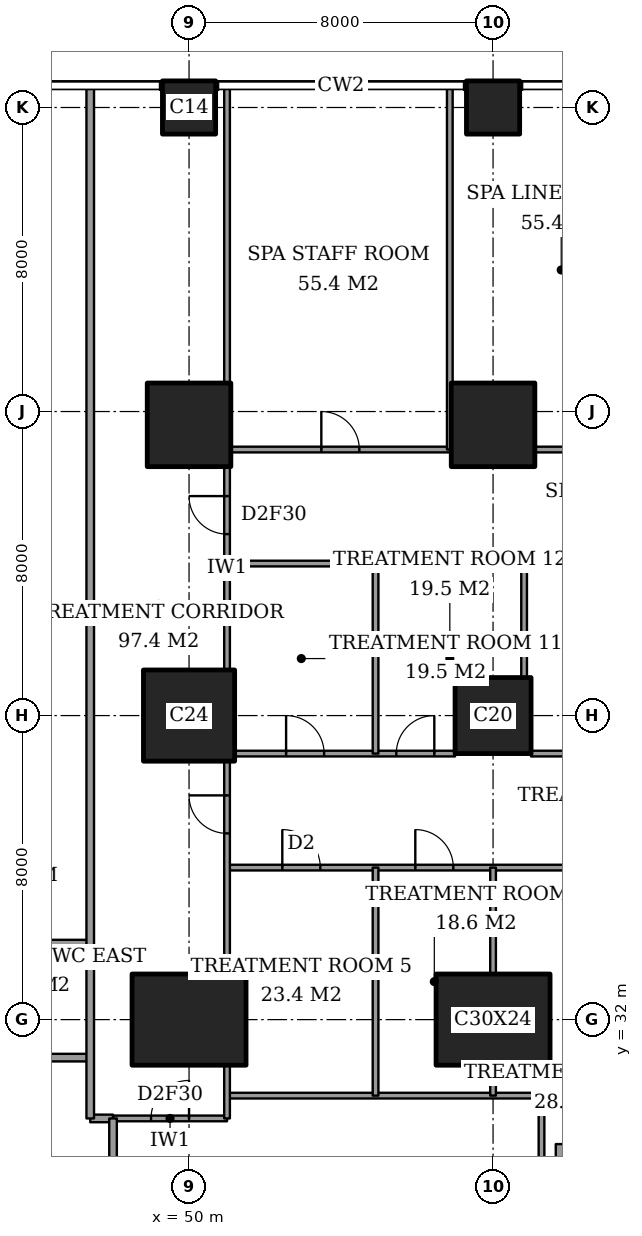
"""IFC4 building model, lengths in metres.
Left out: names, types, materials, properties, quantities, classifications, styles, units other than length and angle.
Written with IfcOpenShell. Run it as: python <this file> out.ifc"""

import sys

from ifc_helpers import new_model, si_unit, direction, frame, frame_2d, origin, origin_2d, place, context, subcontext, project, spatial, rectangle, extrude, element, fill, save


model = new_model("IFC4")
c1 = context("Model", 3, precision=1e-05, world=origin(), true_north=direction((0.0, 1.0)))
c2 = subcontext(c1, "Body", "Model", "MODEL_VIEW")
j1 = project(units=[si_unit("LENGTHUNIT", "METRE"), si_unit("PLANEANGLEUNIT", "RADIAN")], contexts=[c1])
p1 = place(None, origin())
s1 = spatial("IfcSite", under=j1, at=p1, CompositionType="ELEMENT")
p2 = place(p1, origin())
s2 = spatial("IfcBuilding", under=s1, at=p2, CompositionType="ELEMENT")
p3 = place(p2, frame((0.0, 0.0, 11.0)))
s3 = spatial("IfcBuildingStorey", under=s2, at=p3, CompositionType="ELEMENT", Elevation=11.0)
p4 = place(p3, frame((50.0, 32.0, 0.0), z_axis=(0.0, 0.0, 1.0), x_axis=(1.0, 0.0, 0.0)))
e1 = element("IfcColumn", 1, at=p4, inside=s3, PredefinedType="COLUMN", context=c2, shape_type="SweptSolid", body=[
    extrude(rectangle(XDim=3.0, YDim=2.4, at=origin_2d()), origin(), (0.0, 0.0, 1.0), 5.0),
])
p5 = place(p3, frame((50.0, 40.0, 0.0), z_axis=(0.0, 0.0, 1.0), x_axis=(1.0, 0.0, 0.0)))
e2 = element("IfcColumn", 2, at=p5, inside=s3, PredefinedType="COLUMN", context=c2, shape_type="SweptSolid", body=[
    extrude(rectangle(XDim=2.4, YDim=2.4, at=origin_2d()), origin(), (0.0, 0.0, 1.0), 5.0),
])
p6 = place(p3, frame((50.0, 47.65, 0.0), z_axis=(0.0, 0.0, 1.0), x_axis=(1.0, 0.0, 0.0)))
e3 = element("IfcColumn", 3, at=p6, inside=s3, PredefinedType="COLUMN", context=c2, shape_type="SweptSolid", body=[
    extrude(rectangle(XDim=2.2, YDim=2.2, at=origin_2d()), origin(), (0.0, 0.0, 1.0), 5.0),
])
p7 = place(p3, frame((50.0, 56.0, 0.0), z_axis=(0.0, 0.0, 1.0), x_axis=(1.0, 0.0, 0.0)))
e4 = element("IfcColumn", 4, at=p7, inside=s3, PredefinedType="COLUMN", context=c2, shape_type="SweptSolid", body=[
    extrude(rectangle(XDim=1.4, YDim=1.4, at=origin_2d()), origin(), (0.0, 0.0, 1.0), 5.0),
])
p8 = place(p3, frame((58.0, 32.0, 0.0), z_axis=(0.0, 0.0, 1.0), x_axis=(1.0, 0.0, 0.0)))
e5 = element("IfcColumn", 5, at=p8, inside=s3, PredefinedType="COLUMN", context=c2, shape_type="SweptSolid", body=[
    extrude(rectangle(XDim=3.0, YDim=2.4, at=origin_2d()), origin(), (0.0, 0.0, 1.0), 5.0),
])
p9 = place(p3, frame((58.0, 40.0, 0.0), z_axis=(0.0, 0.0, 1.0), x_axis=(1.0, 0.0, 0.0)))
e6 = element("IfcColumn", 6, at=p9, inside=s3, PredefinedType="COLUMN", context=c2, shape_type="SweptSolid", body=[
    extrude(rectangle(XDim=2.0, YDim=2.0, at=origin_2d()), origin(), (0.0, 0.0, 1.0), 5.0),
])
p10 = place(p3, frame((58.0, 47.65, 0.0), z_axis=(0.0, 0.0, 1.0), x_axis=(1.0, 0.0, 0.0)))
e7 = element("IfcColumn", 7, at=p10, inside=s3, PredefinedType="COLUMN", context=c2, shape_type="SweptSolid", body=[
    extrude(rectangle(XDim=2.2, YDim=2.2, at=origin_2d()), origin(), (0.0, 0.0, 1.0), 5.0),
])
p11 = place(p3, frame((58.0, 56.0, 0.0), z_axis=(0.0, 0.0, 1.0), x_axis=(1.0, 0.0, 0.0)))
e8 = element("IfcColumn", 8, at=p11, inside=s3, PredefinedType="COLUMN", context=c2, shape_type="SweptSolid", body=[
    extrude(rectangle(XDim=1.4, YDim=1.4, at=origin_2d()), origin(), (0.0, 0.0, 1.0), 5.0),
])
p12 = place(p3, frame((64.1, 28.35, 0.0), z_axis=(0.0, 0.0, 1.0), x_axis=(-1.0, 0.0, 0.0)))
e9 = element("IfcWall", 9, at=p12, inside=s3, PredefinedType="SHEAR", context=c2, shape_type="SweptSolid", body=[
    extrude(rectangle(XDim=4.45, YDim=0.75, at=frame_2d((2.225, 0.0))), origin(), (0.0, 0.0, 1.0), 5.0),
])
p13 = place(p3, frame((47.4, 29.4, 0.0), z_axis=(0.0, 0.0, 1.0), x_axis=(1.0, 0.0, 0.0)))
e10 = element("IfcWall", 10, at=p13, inside=s3, PredefinedType="PARTITIONING", context=c2, shape_type="SweptSolid", body=[
    extrude(rectangle(XDim=0.6, YDim=0.2, at=frame_2d((0.3, 0.0))), origin(), (0.0, 0.0, 1.0), 4.7),
])
p14 = place(p3, frame((48.0, 29.4, 0.0), z_axis=(0.0, 0.0, 1.0), x_axis=(1.0, 0.0, 0.0)))
e11 = element("IfcWall", 11, at=p14, inside=s3, PredefinedType="PARTITIONING", context=c2, shape_type="SweptSolid", body=[
    extrude(rectangle(XDim=3.0, YDim=0.15, at=frame_2d((1.5, 0.0))), origin(), (0.0, 0.0, 1.0), 4.7),
])
p15 = place(p14, frame((1.0, 0.0, 0.0)))
e12 = element("IfcOpeningElement", 12, at=p15, cuts=e11, PredefinedType="OPENING", context=c2, shape_type="SweptSolid", body=[
    extrude(rectangle(XDim=1.0, YDim=2.1, at=frame_2d((0.5, 1.05))), frame((0.0, 0.085, 0.0), z_axis=(0.0, -1.0, 0.0), x_axis=(1.0, 0.0, 0.0)), (0.0, 0.0, 1.0), 0.17),
])
p16 = place(p3, frame((51.0, 30.0, 0.0), z_axis=(0.0, 0.0, 1.0), x_axis=(1.0, 0.0, 0.0)))
e13 = element("IfcWall", 13, at=p16, inside=s3, PredefinedType="PARTITIONING", context=c2, shape_type="SweptSolid", body=[
    extrude(rectangle(XDim=23.45, YDim=0.15, at=frame_2d((11.725, 0.0))), origin(), (0.0, 0.0, 1.0), 4.7),
])
p17 = place(p3, frame((42.0, 31.0, 0.0), z_axis=(0.0, 0.0, 1.0), x_axis=(1.0, 0.0, 0.0)))
e14 = element("IfcWall", 14, at=p17, inside=s3, PredefinedType="PARTITIONING", context=c2, shape_type="SweptSolid", body=[
    extrude(rectangle(XDim=5.4, YDim=0.2, at=frame_2d((2.7, 0.0))), origin(), (0.0, 0.0, 1.0), 4.7),
])
p18 = place(p17, frame((2.2, 0.0, 0.0)))
e15 = element("IfcOpeningElement", 15, at=p18, cuts=e14, PredefinedType="OPENING", context=c2, shape_type="SweptSolid", body=[
    extrude(rectangle(XDim=1.0, YDim=2.1, at=frame_2d((0.5, 1.05))), frame((0.0, 0.11, 0.0), z_axis=(0.0, -1.0, 0.0), x_axis=(1.0, 0.0, 0.0)), (0.0, 0.0, 1.0), 0.22),
])
p19 = place(p3, frame((42.0, 34.0, 0.0), z_axis=(0.0, 0.0, 1.0), x_axis=(1.0, 0.0, 0.0)))
e16 = element("IfcWall", 16, at=p19, inside=s3, PredefinedType="PARTITIONING", context=c2, shape_type="SweptSolid", body=[
    extrude(rectangle(XDim=5.4, YDim=0.2, at=frame_2d((2.7, 0.0))), origin(), (0.0, 0.0, 1.0), 4.7),
])
p20 = place(p3, frame((51.0, 36.0, 0.0), z_axis=(0.0, 0.0, 1.0), x_axis=(1.0, 0.0, 0.0)))
e17 = element("IfcWall", 17, at=p20, inside=s3, PredefinedType="PARTITIONING", context=c2, shape_type="SweptSolid", body=[
    extrude(rectangle(XDim=23.45, YDim=0.15, at=frame_2d((11.725, 0.0))), origin(), (0.0, 0.0, 1.0), 4.7),
])
p21 = place(p20, frame((1.454, 0.0, 0.0)))
e18 = element("IfcOpeningElement", 18, at=p21, cuts=e17, PredefinedType="OPENING", context=c2, shape_type="SweptSolid", body=[
    extrude(rectangle(XDim=1.0, YDim=2.1, at=frame_2d((0.5, 1.05))), frame((0.0, 0.085, 0.0), z_axis=(0.0, -1.0, 0.0), x_axis=(1.0, 0.0, 0.0)), (0.0, 0.0, 1.0), 0.17),
])
p22 = place(p20, frame((4.954, 0.0, 0.0)))
e19 = element("IfcOpeningElement", 19, at=p22, cuts=e17, PredefinedType="OPENING", context=c2, shape_type="SweptSolid", body=[
    extrude(rectangle(XDim=1.0, YDim=2.1, at=frame_2d((0.5, 1.05))), frame((0.0, 0.085, 0.0), z_axis=(0.0, -1.0, 0.0), x_axis=(1.0, 0.0, 0.0)), (0.0, 0.0, 1.0), 0.17),
])
p23 = place(p20, frame((8.863, 0.0, 0.0)))
e20 = element("IfcOpeningElement", 20, at=p23, cuts=e17, PredefinedType="OPENING", context=c2, shape_type="SweptSolid", body=[
    extrude(rectangle(XDim=1.0, YDim=2.1, at=frame_2d((0.5, 1.05))), frame((0.0, 0.085, 0.0), z_axis=(0.0, -1.0, 0.0), x_axis=(1.0, 0.0, 0.0)), (0.0, 0.0, 1.0), 0.17),
])
p24 = place(p20, frame((12.688, 0.0, 0.0)))
e21 = element("IfcOpeningElement", 21, at=p24, cuts=e17, PredefinedType="OPENING", context=c2, shape_type="SweptSolid", body=[
    extrude(rectangle(XDim=1.0, YDim=2.1, at=frame_2d((0.5, 1.05))), frame((0.0, 0.085, 0.0), z_axis=(0.0, -1.0, 0.0), x_axis=(1.0, 0.0, 0.0)), (0.0, 0.0, 1.0), 0.17),
])
p25 = place(p20, frame((16.596, 0.0, 0.0)))
e22 = element("IfcOpeningElement", 22, at=p25, cuts=e17, PredefinedType="OPENING", context=c2, shape_type="SweptSolid", body=[
    extrude(rectangle(XDim=1.0, YDim=2.1, at=frame_2d((0.5, 1.05))), frame((0.0, 0.085, 0.0), z_axis=(0.0, -1.0, 0.0), x_axis=(1.0, 0.0, 0.0)), (0.0, 0.0, 1.0), 0.17),
])
p26 = place(p20, frame((20.996, 0.0, 0.0)))
e23 = element("IfcOpeningElement", 23, at=p26, cuts=e17, PredefinedType="OPENING", context=c2, shape_type="SweptSolid", body=[
    extrude(rectangle(XDim=1.0, YDim=2.1, at=frame_2d((0.5, 1.05))), frame((0.0, 0.085, 0.0), z_axis=(0.0, -1.0, 0.0), x_axis=(1.0, 0.0, 0.0)), (0.0, 0.0, 1.0), 0.17),
])
p27 = place(p3, frame((51.2, 39.0, 0.0), z_axis=(0.0, 0.0, 1.0), x_axis=(1.0, 0.0, 0.0)))
e24 = element("IfcWall", 24, at=p27, inside=s3, PredefinedType="PARTITIONING", context=c2, shape_type="SweptSolid", body=[
    extrude(rectangle(XDim=5.8, YDim=0.15, at=frame_2d((2.9, 0.0))), origin(), (0.0, 0.0, 1.0), 4.7),
])
p28 = place(p27, frame((1.354, 0.0, 0.0)))
e25 = element("IfcOpeningElement", 25, at=p28, cuts=e24, PredefinedType="OPENING", context=c2, shape_type="SweptSolid", body=[
    extrude(rectangle(XDim=1.0, YDim=2.1, at=frame_2d((0.5, 1.05))), frame((0.0, 0.085, 0.0), z_axis=(0.0, -1.0, 0.0), x_axis=(1.0, 0.0, 0.0)), (0.0, 0.0, 1.0), 0.17),
])
p29 = place(p27, frame((4.254, 0.0, 0.0)))
e26 = element("IfcOpeningElement", 26, at=p29, cuts=e24, PredefinedType="OPENING", context=c2, shape_type="SweptSolid", body=[
    extrude(rectangle(XDim=1.0, YDim=2.1, at=frame_2d((0.5, 1.05))), frame((0.0, 0.085, 0.0), z_axis=(0.0, -1.0, 0.0), x_axis=(1.0, 0.0, 0.0)), (0.0, 0.0, 1.0), 0.17),
])
p30 = place(p3, frame((59.0, 39.0, 0.0), z_axis=(0.0, 0.0, 1.0), x_axis=(1.0, 0.0, 0.0)))
e27 = element("IfcWall", 27, at=p30, inside=s3, PredefinedType="PARTITIONING", context=c2, shape_type="SweptSolid", body=[
    extrude(rectangle(XDim=5.55, YDim=0.15, at=frame_2d((2.775, 0.0))), origin(), (0.0, 0.0, 1.0), 4.7),
])
p31 = place(p30, frame((1.363, 0.0, 0.0)))
e28 = element("IfcOpeningElement", 28, at=p31, cuts=e27, PredefinedType="OPENING", context=c2, shape_type="SweptSolid", body=[
    extrude(rectangle(XDim=1.0, YDim=2.1, at=frame_2d((0.5, 1.05))), frame((0.0, 0.085, 0.0), z_axis=(0.0, -1.0, 0.0), x_axis=(1.0, 0.0, 0.0)), (0.0, 0.0, 1.0), 0.17),
])
p32 = place(p30, frame((4.137, 0.0, 0.0)))
e29 = element("IfcOpeningElement", 29, at=p32, cuts=e27, PredefinedType="OPENING", context=c2, shape_type="SweptSolid", body=[
    extrude(rectangle(XDim=1.0, YDim=2.1, at=frame_2d((0.5, 1.05))), frame((0.0, 0.085, 0.0), z_axis=(0.0, -1.0, 0.0), x_axis=(1.0, 0.0, 0.0)), (0.0, 0.0, 1.0), 0.17),
])
p33 = place(p3, frame((51.0, 44.0, 0.0), z_axis=(0.0, 0.0, 1.0), x_axis=(1.0, 0.0, 0.0)))
e30 = element("IfcWall", 30, at=p33, inside=s3, PredefinedType="PARTITIONING", context=c2, shape_type="SweptSolid", body=[
    extrude(rectangle(XDim=23.45, YDim=0.15, at=frame_2d((11.725, 0.0))), origin(), (0.0, 0.0, 1.0), 4.7),
])
p34 = place(p3, frame((51.1, 47.0, 0.0), z_axis=(0.0, 0.0, 1.0), x_axis=(1.0, 0.0, 0.0)))
e31 = element("IfcWall", 31, at=p34, inside=s3, PredefinedType="PARTITIONING", context=c2, shape_type="SweptSolid", body=[
    extrude(rectangle(XDim=5.8, YDim=0.15, at=frame_2d((2.9, 0.0))), origin(), (0.0, 0.0, 1.0), 4.7),
])
p35 = place(p34, frame((2.381, 0.0, 0.0)))
e32 = element("IfcOpeningElement", 32, at=p35, cuts=e31, PredefinedType="OPENING", context=c2, shape_type="SweptSolid", body=[
    extrude(rectangle(XDim=1.0, YDim=2.1, at=frame_2d((0.5, 1.05))), frame((0.0, 0.085, 0.0), z_axis=(0.0, -1.0, 0.0), x_axis=(1.0, 0.0, 0.0)), (0.0, 0.0, 1.0), 0.17),
])
p36 = place(p3, frame((59.1, 47.0, 0.0), z_axis=(0.0, 0.0, 1.0), x_axis=(1.0, 0.0, 0.0)))
e33 = element("IfcWall", 33, at=p36, inside=s3, PredefinedType="PARTITIONING", context=c2, shape_type="SweptSolid", body=[
    extrude(rectangle(XDim=6.9, YDim=0.15, at=frame_2d((3.45, 0.0))), origin(), (0.0, 0.0, 1.0), 4.7),
])
p37 = place(p36, frame((1.363, 0.0, 0.0)))
e34 = element("IfcOpeningElement", 34, at=p37, cuts=e33, PredefinedType="OPENING", context=c2, shape_type="SweptSolid", body=[
    extrude(rectangle(XDim=0.9, YDim=2.1, at=frame_2d((0.45, 1.05))), frame((0.0, 0.085, 0.0), z_axis=(0.0, -1.0, 0.0), x_axis=(1.0, 0.0, 0.0)), (0.0, 0.0, 1.0), 0.17),
])
p38 = place(p36, frame((4.812, 0.0, 0.0)))
e35 = element("IfcOpeningElement", 35, at=p38, cuts=e33, PredefinedType="OPENING", context=c2, shape_type="SweptSolid", body=[
    extrude(rectangle(XDim=0.9, YDim=2.1, at=frame_2d((0.45, 1.05))), frame((0.0, 0.085, 0.0), z_axis=(0.0, -1.0, 0.0), x_axis=(1.0, 0.0, 0.0)), (0.0, 0.0, 1.0), 0.17),
])
p39 = place(p3, frame((47.4, 29.4, 0.0), z_axis=(0.0, 0.0, 1.0), x_axis=(0.0, 1.0, 0.0)))
e36 = element("IfcWall", 36, at=p39, inside=s3, PredefinedType="PARTITIONING", context=c2, shape_type="SweptSolid", body=[
    extrude(rectangle(XDim=27.161, YDim=0.2, at=frame_2d((13.581, 0.0))), origin(), (0.0, 0.0, 1.0), 4.7),
])
p40 = place(p3, frame((48.0, 28.0, 0.0), z_axis=(0.0, 0.0, 1.0), x_axis=(0.0, 1.0, 0.0)))
e37 = element("IfcWall", 37, at=p40, inside=s3, PredefinedType="PARTITIONING", context=c2, shape_type="SweptSolid", body=[
    extrude(rectangle(XDim=1.4, YDim=0.2, at=frame_2d((0.7, 0.0))), origin(), (0.0, 0.0, 1.0), 4.7),
])
p41 = place(p3, frame((51.0, 29.4, 0.0), z_axis=(0.0, 0.0, 1.0), x_axis=(0.0, 1.0, 0.0)))
e38 = element("IfcWall", 38, at=p41, inside=s3, PredefinedType="PARTITIONING", context=c2, shape_type="SweptSolid", body=[
    extrude(rectangle(XDim=1.4, YDim=0.15, at=frame_2d((0.7, 0.0))), origin(), (0.0, 0.0, 1.0), 4.7),
])
p42 = place(p3, frame((51.0, 33.2, 0.0), z_axis=(0.0, 0.0, 1.0), x_axis=(0.0, 1.0, 0.0)))
e39 = element("IfcWall", 39, at=p42, inside=s3, PredefinedType="PARTITIONING", context=c2, shape_type="SweptSolid", body=[
    extrude(rectangle(XDim=5.6, YDim=0.15, at=frame_2d((2.8, 0.0))), origin(), (0.0, 0.0, 1.0), 4.7),
])
p43 = place(p42, frame((3.7, 0.0, 0.0)))
e40 = element("IfcOpeningElement", 40, at=p43, cuts=e39, PredefinedType="OPENING", context=c2, shape_type="SweptSolid", body=[
    extrude(rectangle(XDim=1.0, YDim=2.1, at=frame_2d((0.5, 1.05))), frame((0.0, 0.085, 0.0), z_axis=(0.0, -1.0, 0.0), x_axis=(1.0, 0.0, 0.0)), (0.0, 0.0, 1.0), 0.17),
])
p44 = place(p3, frame((51.0, 41.2, 0.0), z_axis=(0.0, 0.0, 1.0), x_axis=(0.0, 1.0, 0.0)))
e41 = element("IfcWall", 41, at=p44, inside=s3, PredefinedType="PARTITIONING", context=c2, shape_type="SweptSolid", body=[
    extrude(rectangle(XDim=5.35, YDim=0.15, at=frame_2d((2.675, 0.0))), origin(), (0.0, 0.0, 1.0), 4.7),
])
p45 = place(p44, frame((3.575, 0.0, 0.0)))
e42 = element("IfcOpeningElement", 42, at=p45, cuts=e41, PredefinedType="OPENING", context=c2, shape_type="SweptSolid", body=[
    extrude(rectangle(XDim=1.0, YDim=2.1, at=frame_2d((0.5, 1.05))), frame((0.0, 0.085, 0.0), z_axis=(0.0, -1.0, 0.0), x_axis=(1.0, 0.0, 0.0)), (0.0, 0.0, 1.0), 0.17),
])
p46 = place(p3, frame((51.0, 48.75, 0.0), z_axis=(0.0, 0.0, 1.0), x_axis=(0.0, 1.0, 0.0)))
e43 = element("IfcWall", 43, at=p46, inside=s3, PredefinedType="PARTITIONING", context=c2, shape_type="SweptSolid", body=[
    extrude(rectangle(XDim=7.811, YDim=0.15, at=frame_2d((3.906, 0.0))), origin(), (0.0, 0.0, 1.0), 4.7),
])
p47 = place(p3, frame((54.908, 30.0, 0.0), z_axis=(0.0, 0.0, 1.0), x_axis=(0.0, 1.0, 0.0)))
e44 = element("IfcWall", 44, at=p47, inside=s3, PredefinedType="PARTITIONING", context=c2, shape_type="SweptSolid", body=[
    extrude(rectangle(XDim=6.0, YDim=0.15, at=frame_2d((3.0, 0.0))), origin(), (0.0, 0.0, 1.0), 4.7),
])
p48 = place(p3, frame((54.908, 39.0, 0.0), z_axis=(0.0, 0.0, 1.0), x_axis=(0.0, 1.0, 0.0)))
e45 = element("IfcWall", 45, at=p48, inside=s3, PredefinedType="PARTITIONING", context=c2, shape_type="SweptSolid", body=[
    extrude(rectangle(XDim=5.0, YDim=0.15, at=frame_2d((2.5, 0.0))), origin(), (0.0, 0.0, 1.0), 4.7),
])
p49 = place(p3, frame((56.862, 47.0, 0.0), z_axis=(0.0, 0.0, 1.0), x_axis=(0.0, 1.0, 0.0)))
e46 = element("IfcWall", 46, at=p49, inside=s3, PredefinedType="PARTITIONING", context=c2, shape_type="SweptSolid", body=[
    extrude(rectangle(XDim=9.561, YDim=0.15, at=frame_2d((4.781, 0.0))), origin(), (0.0, 0.0, 1.0), 4.7),
])
p50 = place(p3, frame((58.0, 30.0, 0.0), z_axis=(0.0, 0.0, 1.0), x_axis=(0.0, 1.0, 0.0)))
e47 = element("IfcWall", 47, at=p50, inside=s3, PredefinedType="PARTITIONING", context=c2, shape_type="SweptSolid", body=[
    extrude(rectangle(XDim=0.8, YDim=0.15, at=frame_2d((0.4, 0.0))), origin(), (0.0, 0.0, 1.0), 3.3),
])
p51 = place(p3, frame((58.0, 33.2, 0.0), z_axis=(0.0, 0.0, 1.0), x_axis=(0.0, 1.0, 0.0)))
e48 = element("IfcWall", 48, at=p51, inside=s3, PredefinedType="PARTITIONING", context=c2, shape_type="SweptSolid", body=[
    extrude(rectangle(XDim=2.8, YDim=0.15, at=frame_2d((1.4, 0.0))), origin(), (0.0, 0.0, 1.0), 3.3),
])
p52 = place(p3, frame((58.817, 41.0, 0.0), z_axis=(0.0, 0.0, 1.0), x_axis=(0.0, 1.0, 0.0)))
e49 = element("IfcWall", 49, at=p52, inside=s3, PredefinedType="PARTITIONING", context=c2, shape_type="SweptSolid", body=[
    extrude(rectangle(XDim=3.0, YDim=0.15, at=frame_2d((1.5, 0.0))), origin(), (0.0, 0.0, 1.0), 4.7),
])
p53 = place(p3, frame((59.275, 28.35, 0.0), z_axis=(0.0, 0.0, 1.0), x_axis=(0.0, 1.0, 0.0)))
e50 = element("IfcWall", 50, at=p53, inside=s3, PredefinedType="PARTITIONING", context=c2, shape_type="SweptSolid", body=[
    extrude(rectangle(XDim=1.65, YDim=0.15, at=frame_2d((0.825, 0.0))), origin(), (0.0, 0.0, 1.0), 4.7),
])
p54 = place(p15, origin())
e51 = element("IfcDoor", 51, at=p54, inside=s3, OperationType="SINGLE_SWING_LEFT", PredefinedType="DOOR", context=c2, shape_type="SweptSolid", body=[
    extrude(rectangle(XDim=1.0, YDim=2.1, at=frame_2d((0.5, 1.05))), frame((0.0, 0.025, 0.0), z_axis=(0.0, -1.0, 0.0), x_axis=(1.0, 0.0, 0.0)), (0.0, 0.0, 1.0), 0.05),
])
fill(e12, e51)
p55 = place(p43, origin())
e52 = element("IfcDoor", 52, at=p55, inside=s3, OperationType="SINGLE_SWING_LEFT", PredefinedType="DOOR", context=c2, shape_type="SweptSolid", body=[
    extrude(rectangle(XDim=1.0, YDim=2.1, at=frame_2d((0.5, 1.05))), frame((0.0, 0.025, 0.0), z_axis=(0.0, -1.0, 0.0), x_axis=(1.0, 0.0, 0.0)), (0.0, 0.0, 1.0), 0.05),
])
fill(e40, e52)
p56 = place(p45, origin())
e53 = element("IfcDoor", 53, at=p56, inside=s3, OperationType="SINGLE_SWING_LEFT", PredefinedType="DOOR", context=c2, shape_type="SweptSolid", body=[
    extrude(rectangle(XDim=1.0, YDim=2.1, at=frame_2d((0.5, 1.05))), frame((0.0, 0.025, 0.0), z_axis=(0.0, -1.0, 0.0), x_axis=(1.0, 0.0, 0.0)), (0.0, 0.0, 1.0), 0.05),
])
fill(e42, e53)
p57 = place(p21, origin())
e54 = element("IfcDoor", 54, at=p57, inside=s3, OperationType="SINGLE_SWING_RIGHT", PredefinedType="DOOR", context=c2, shape_type="SweptSolid", body=[
    extrude(rectangle(XDim=1.0, YDim=2.1, at=frame_2d((0.5, 1.05))), frame((0.0, 0.025, 0.0), z_axis=(0.0, -1.0, 0.0), x_axis=(1.0, 0.0, 0.0)), (0.0, 0.0, 1.0), 0.05),
])
fill(e18, e54)
p58 = place(p22, origin())
e55 = element("IfcDoor", 55, at=p58, inside=s3, OperationType="SINGLE_SWING_RIGHT", PredefinedType="DOOR", context=c2, shape_type="SweptSolid", body=[
    extrude(rectangle(XDim=1.0, YDim=2.1, at=frame_2d((0.5, 1.05))), frame((0.0, 0.025, 0.0), z_axis=(0.0, -1.0, 0.0), x_axis=(1.0, 0.0, 0.0)), (0.0, 0.0, 1.0), 0.05),
])
fill(e19, e55)
p59 = place(p28, origin())
e56 = element("IfcDoor", 56, at=p59, inside=s3, OperationType="SINGLE_SWING_RIGHT", PredefinedType="DOOR", context=c2, shape_type="SweptSolid", body=[
    extrude(rectangle(XDim=1.0, YDim=2.1, at=frame_2d((0.5, 1.05))), frame((0.0, 0.025, 0.0), z_axis=(0.0, -1.0, 0.0), x_axis=(1.0, 0.0, 0.0)), (0.0, 0.0, 1.0), 0.05),
])
fill(e25, e56)
p60 = place(p29, origin())
e57 = element("IfcDoor", 57, at=p60, inside=s3, OperationType="SINGLE_SWING_LEFT", PredefinedType="DOOR", context=c2, shape_type="SweptSolid", body=[
    extrude(rectangle(XDim=1.0, YDim=2.1, at=frame_2d((0.5, 1.05))), frame((0.0, 0.025, 0.0), z_axis=(0.0, -1.0, 0.0), x_axis=(1.0, 0.0, 0.0)), (0.0, 0.0, 1.0), 0.05),
])
fill(e26, e57)
p61 = place(p35, origin())
e58 = element("IfcDoor", 58, at=p61, inside=s3, OperationType="SINGLE_SWING_RIGHT", PredefinedType="DOOR", context=c2, shape_type="SweptSolid", body=[
    extrude(rectangle(XDim=1.0, YDim=2.1, at=frame_2d((0.5, 1.05))), frame((0.0, 0.025, 0.0), z_axis=(0.0, -1.0, 0.0), x_axis=(1.0, 0.0, 0.0)), (0.0, 0.0, 1.0), 0.05),
])
fill(e32, e58)
save(model, sys.argv[1])
